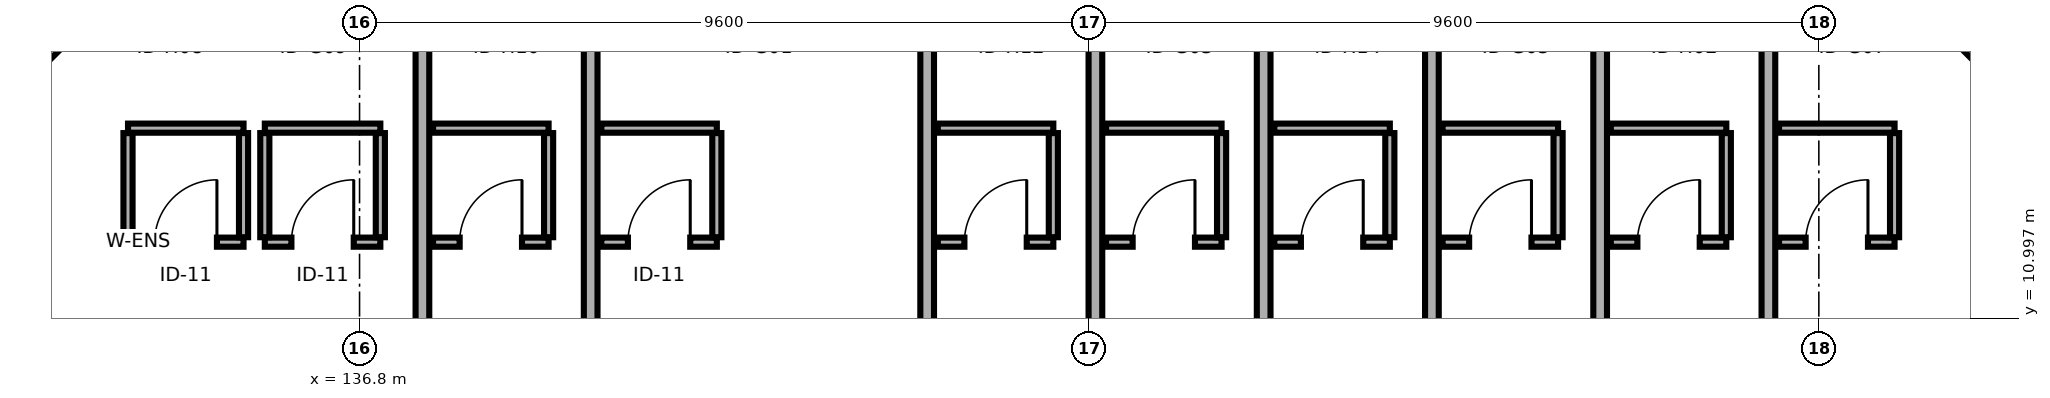
"""IFC4 building model, lengths in metres.
Left out: names, types, materials, properties, quantities, classifications, styles, units other than length and angle.
Written with IfcOpenShell. Run it as: python <this file> out.ifc"""

import sys

from ifc_helpers import new_model, si_unit, direction, frame, frame_2d, origin, place, context, subcontext, project, spatial, rectangle, extrude, element, fill, save


model = new_model("IFC4")
c1 = context("Model", 3, precision=1e-05, world=origin(), true_north=direction((0.0, 1.0)))
c2 = subcontext(c1, "Body", "Model", "MODEL_VIEW")
j1 = project(units=[si_unit("LENGTHUNIT", "METRE"), si_unit("PLANEANGLEUNIT", "RADIAN")], contexts=[c1])
p1 = place(None, origin())
s1 = spatial("IfcSite", under=j1, at=p1, CompositionType="ELEMENT")
p2 = place(p1, origin())
s2 = spatial("IfcBuilding", under=s1, at=p2, CompositionType="ELEMENT")
p3 = place(p2, frame((0.0, 0.0, 21.5)))
s3 = spatial("IfcBuildingStorey", under=s2, at=p3, CompositionType="ELEMENT", Elevation=21.5)
p4 = place(p3, frame((133.754, 12.0, 0.0), z_axis=(0.0, 0.0, 1.0), x_axis=(1.0, 0.0, 0.0)))
e1 = element("IfcWall", 1, at=p4, inside=s3, PredefinedType="PARTITIONING", context=c2, shape_type="SweptSolid", body=[
    extrude(rectangle(XDim=1.52, YDim=0.12, at=frame_2d((0.76, 0.0))), origin(), (0.0, 0.0, 1.0), 2.73),
])
p5 = place(p4, frame((0.35, 0.0, 0.0)))
e2 = element("IfcOpeningElement", 2, at=p5, cuts=e1, PredefinedType="OPENING", context=c2, shape_type="SweptSolid", body=[
    extrude(rectangle(XDim=0.82, YDim=2.08, at=frame_2d((0.41, 1.04))), frame((0.0, 0.07, 0.0), z_axis=(0.0, -1.0, 0.0), x_axis=(1.0, 0.0, 0.0)), (0.0, 0.0, 1.0), 0.14),
])
p6 = place(p3, frame((133.754, 13.5, 0.0), z_axis=(0.0, 0.0, 1.0), x_axis=(1.0, 0.0, 0.0)))
e3 = element("IfcWall", 3, at=p6, inside=s3, PredefinedType="PARTITIONING", context=c2, shape_type="SweptSolid", body=[
    extrude(rectangle(XDim=1.52, YDim=0.12, at=frame_2d((0.76, 0.0))), origin(), (0.0, 0.0, 1.0), 3.195),
])
p7 = place(p3, frame((133.754, 12.065, 0.0), z_axis=(0.0, 0.0, 1.0), x_axis=(0.0, 1.0, 0.0)))
e4 = element("IfcWall", 4, at=p7, inside=s3, PredefinedType="PARTITIONING", context=c2, shape_type="SweptSolid", body=[
    extrude(rectangle(XDim=1.37, YDim=0.12, at=frame_2d((0.685, 0.0))), origin(), (0.0, 0.0, 1.0), 3.195),
])
p8 = place(p3, frame((135.274, 12.065, 0.0), z_axis=(0.0, 0.0, 1.0), x_axis=(0.0, 1.0, 0.0)))
e5 = element("IfcWall", 5, at=p8, inside=s3, PredefinedType="PARTITIONING", context=c2, shape_type="SweptSolid", body=[
    extrude(rectangle(XDim=1.37, YDim=0.12, at=frame_2d((0.685, 0.0))), origin(), (0.0, 0.0, 1.0), 2.73),
])
p9 = place(p3, frame((133.2, 15.0, 0.0), z_axis=(0.0, 0.0, 1.0), x_axis=(-0.707106781187, -0.707106781187, 0.0)))
e6 = element("IfcWall", 6, at=p9, inside=s3, PredefinedType="PARTITIONING", context=c2, shape_type="SweptSolid", body=[
    extrude(rectangle(XDim=5.698, YDim=0.18, at=frame_2d((2.849, 0.0))), origin(), (0.0, 0.0, 1.0), 2.68),
])
p10 = place(p3, frame((135.554, 12.0, 0.0), z_axis=(0.0, 0.0, 1.0), x_axis=(1.0, 0.0, 0.0)))
e7 = element("IfcWall", 7, at=p10, inside=s3, PredefinedType="PARTITIONING", context=c2, shape_type="SweptSolid", body=[
    extrude(rectangle(XDim=1.52, YDim=0.12, at=frame_2d((0.76, 0.0))), origin(), (0.0, 0.0, 1.0), 3.195),
])
p11 = place(p10, frame((0.35, 0.0, 0.0)))
e8 = element("IfcOpeningElement", 8, at=p11, cuts=e7, PredefinedType="OPENING", context=c2, shape_type="SweptSolid", body=[
    extrude(rectangle(XDim=0.82, YDim=2.08, at=frame_2d((0.41, 1.04))), frame((0.0, 0.07, 0.0), z_axis=(0.0, -1.0, 0.0), x_axis=(1.0, 0.0, 0.0)), (0.0, 0.0, 1.0), 0.14),
])
p12 = place(p3, frame((135.554, 13.5, 0.0), z_axis=(0.0, 0.0, 1.0), x_axis=(1.0, 0.0, 0.0)))
e9 = element("IfcWall", 9, at=p12, inside=s3, PredefinedType="PARTITIONING", context=c2, shape_type="SweptSolid", body=[
    extrude(rectangle(XDim=1.52, YDim=0.12, at=frame_2d((0.76, 0.0))), origin(), (0.0, 0.0, 1.0), 2.73),
])
p13 = place(p3, frame((135.554, 12.065, 0.0), z_axis=(0.0, 0.0, 1.0), x_axis=(0.0, 1.0, 0.0)))
e10 = element("IfcWall", 10, at=p13, inside=s3, PredefinedType="PARTITIONING", context=c2, shape_type="SweptSolid", body=[
    extrude(rectangle(XDim=1.37, YDim=0.12, at=frame_2d((0.685, 0.0))), origin(), (0.0, 0.0, 1.0), 2.73),
])
p14 = place(p3, frame((137.073, 12.065, 0.0), z_axis=(0.0, 0.0, 1.0), x_axis=(0.0, 1.0, 0.0)))
e11 = element("IfcWall", 11, at=p14, inside=s3, PredefinedType="PARTITIONING", context=c2, shape_type="SweptSolid", body=[
    extrude(rectangle(XDim=1.37, YDim=0.12, at=frame_2d((0.685, 0.0))), origin(), (0.0, 0.0, 1.0), 3.195),
])
p15 = place(p3, frame((137.627, 6.454, 0.0), z_axis=(0.0, 0.0, 1.0), x_axis=(0.0, 1.0, 0.0)))
e12 = element("IfcWall", 12, at=p15, inside=s3, PredefinedType="PARTITIONING", context=c2, shape_type="SweptSolid", body=[
    extrude(rectangle(XDim=8.546, YDim=0.18, at=frame_2d((4.273, 0.0))), origin(), (0.0, 0.0, 1.0), 2.68),
])
p16 = place(p3, frame((137.767, 12.0, 0.0), z_axis=(0.0, 0.0, 1.0), x_axis=(1.0, 0.0, 0.0)))
e13 = element("IfcWall", 13, at=p16, inside=s3, PredefinedType="PARTITIONING", context=c2, shape_type="SweptSolid", body=[
    extrude(rectangle(XDim=1.52, YDim=0.12, at=frame_2d((0.76, 0.0))), origin(), (0.0, 0.0, 1.0), 3.195),
])
p17 = place(p16, frame((0.35, 0.0, 0.0)))
e14 = element("IfcOpeningElement", 14, at=p17, cuts=e13, PredefinedType="OPENING", context=c2, shape_type="SweptSolid", body=[
    extrude(rectangle(XDim=0.82, YDim=2.08, at=frame_2d((0.41, 1.04))), frame((0.0, 0.07, 0.0), z_axis=(0.0, -1.0, 0.0), x_axis=(1.0, 0.0, 0.0)), (0.0, 0.0, 1.0), 0.14),
])
p18 = place(p3, frame((137.767, 13.5, 0.0), z_axis=(0.0, 0.0, 1.0), x_axis=(1.0, 0.0, 0.0)))
e15 = element("IfcWall", 15, at=p18, inside=s3, PredefinedType="PARTITIONING", context=c2, shape_type="SweptSolid", body=[
    extrude(rectangle(XDim=1.52, YDim=0.12, at=frame_2d((0.76, 0.0))), origin(), (0.0, 0.0, 1.0), 3.195),
])
p19 = place(p3, frame((139.287, 12.065, 0.0), z_axis=(0.0, 0.0, 1.0), x_axis=(0.0, 1.0, 0.0)))
e16 = element("IfcWall", 16, at=p19, inside=s3, PredefinedType="PARTITIONING", context=c2, shape_type="SweptSolid", body=[
    extrude(rectangle(XDim=1.37, YDim=0.12, at=frame_2d((0.685, 0.0))), origin(), (0.0, 0.0, 1.0), 3.195),
])
p20 = place(p3, frame((139.841, 6.156, 0.0), z_axis=(0.0, 0.0, 1.0), x_axis=(0.0, 1.0, 0.0)))
e17 = element("IfcWall", 17, at=p20, inside=s3, PredefinedType="PARTITIONING", context=c2, shape_type="SweptSolid", body=[
    extrude(rectangle(XDim=8.844, YDim=0.18, at=frame_2d((4.422, 0.0))), origin(), (0.0, 0.0, 1.0), 2.68),
])
p21 = place(p3, frame((139.981, 12.0, 0.0), z_axis=(0.0, 0.0, 1.0), x_axis=(1.0, 0.0, 0.0)))
e18 = element("IfcWall", 18, at=p21, inside=s3, PredefinedType="PARTITIONING", context=c2, shape_type="SweptSolid", body=[
    extrude(rectangle(XDim=1.52, YDim=0.12, at=frame_2d((0.76, 0.0))), origin(), (0.0, 0.0, 1.0), 2.73),
])
p22 = place(p21, frame((0.35, 0.0, 0.0)))
e19 = element("IfcOpeningElement", 19, at=p22, cuts=e18, PredefinedType="OPENING", context=c2, shape_type="SweptSolid", body=[
    extrude(rectangle(XDim=0.82, YDim=2.08, at=frame_2d((0.41, 1.04))), frame((0.0, 0.07, 0.0), z_axis=(0.0, -1.0, 0.0), x_axis=(1.0, 0.0, 0.0)), (0.0, 0.0, 1.0), 0.14),
])
p23 = place(p3, frame((139.981, 13.5, 0.0), z_axis=(0.0, 0.0, 1.0), x_axis=(1.0, 0.0, 0.0)))
e20 = element("IfcWall", 20, at=p23, inside=s3, PredefinedType="PARTITIONING", context=c2, shape_type="SweptSolid", body=[
    extrude(rectangle(XDim=1.52, YDim=0.12, at=frame_2d((0.76, 0.0))), origin(), (0.0, 0.0, 1.0), 2.73),
])
p24 = place(p3, frame((141.501, 12.065, 0.0), z_axis=(0.0, 0.0, 1.0), x_axis=(0.0, 1.0, 0.0)))
e21 = element("IfcWall", 21, at=p24, inside=s3, PredefinedType="PARTITIONING", context=c2, shape_type="SweptSolid", body=[
    extrude(rectangle(XDim=1.37, YDim=0.12, at=frame_2d((0.685, 0.0))), origin(), (0.0, 0.0, 1.0), 2.73),
])
p25 = place(p3, frame((144.268, 5.99, 0.0), z_axis=(0.0, 0.0, 1.0), x_axis=(0.0, 1.0, 0.0)))
e22 = element("IfcWall", 22, at=p25, inside=s3, PredefinedType="PARTITIONING", context=c2, shape_type="SweptSolid", body=[
    extrude(rectangle(XDim=9.01, YDim=0.18, at=frame_2d((4.505, 0.0))), origin(), (0.0, 0.0, 1.0), 2.68),
])
p26 = place(p3, frame((144.408, 12.0, 0.0), z_axis=(0.0, 0.0, 1.0), x_axis=(1.0, 0.0, 0.0)))
e23 = element("IfcWall", 23, at=p26, inside=s3, PredefinedType="PARTITIONING", context=c2, shape_type="SweptSolid", body=[
    extrude(rectangle(XDim=1.52, YDim=0.12, at=frame_2d((0.76, 0.0))), origin(), (0.0, 0.0, 1.0), 3.195),
])
p27 = place(p26, frame((0.35, 0.0, 0.0)))
e24 = element("IfcOpeningElement", 24, at=p27, cuts=e23, PredefinedType="OPENING", context=c2, shape_type="SweptSolid", body=[
    extrude(rectangle(XDim=0.82, YDim=2.08, at=frame_2d((0.41, 1.04))), frame((0.0, 0.07, 0.0), z_axis=(0.0, -1.0, 0.0), x_axis=(1.0, 0.0, 0.0)), (0.0, 0.0, 1.0), 0.14),
])
p28 = place(p3, frame((144.408, 13.5, 0.0), z_axis=(0.0, 0.0, 1.0), x_axis=(1.0, 0.0, 0.0)))
e25 = element("IfcWall", 25, at=p28, inside=s3, PredefinedType="PARTITIONING", context=c2, shape_type="SweptSolid", body=[
    extrude(rectangle(XDim=1.52, YDim=0.12, at=frame_2d((0.76, 0.0))), origin(), (0.0, 0.0, 1.0), 3.195),
])
p29 = place(p3, frame((145.928, 12.065, 0.0), z_axis=(0.0, 0.0, 1.0), x_axis=(0.0, 1.0, 0.0)))
e26 = element("IfcWall", 26, at=p29, inside=s3, PredefinedType="PARTITIONING", context=c2, shape_type="SweptSolid", body=[
    extrude(rectangle(XDim=1.37, YDim=0.12, at=frame_2d((0.685, 0.0))), origin(), (0.0, 0.0, 1.0), 3.195),
])
p30 = place(p3, frame((146.482, 5.99, 0.0), z_axis=(0.0, 0.0, 1.0), x_axis=(0.0, 1.0, 0.0)))
e27 = element("IfcWall", 27, at=p30, inside=s3, PredefinedType="PARTITIONING", context=c2, shape_type="SweptSolid", body=[
    extrude(rectangle(XDim=9.01, YDim=0.18, at=frame_2d((4.505, 0.0))), origin(), (0.0, 0.0, 1.0), 2.68),
])
p31 = place(p3, frame((146.622, 12.0, 0.0), z_axis=(0.0, 0.0, 1.0), x_axis=(1.0, 0.0, 0.0)))
e28 = element("IfcWall", 28, at=p31, inside=s3, PredefinedType="PARTITIONING", context=c2, shape_type="SweptSolid", body=[
    extrude(rectangle(XDim=1.52, YDim=0.12, at=frame_2d((0.76, 0.0))), origin(), (0.0, 0.0, 1.0), 3.195),
])
p32 = place(p31, frame((0.35, 0.0, 0.0)))
e29 = element("IfcOpeningElement", 29, at=p32, cuts=e28, PredefinedType="OPENING", context=c2, shape_type="SweptSolid", body=[
    extrude(rectangle(XDim=0.82, YDim=2.08, at=frame_2d((0.41, 1.04))), frame((0.0, 0.07, 0.0), z_axis=(0.0, -1.0, 0.0), x_axis=(1.0, 0.0, 0.0)), (0.0, 0.0, 1.0), 0.14),
])
p33 = place(p3, frame((146.622, 13.5, 0.0), z_axis=(0.0, 0.0, 1.0), x_axis=(1.0, 0.0, 0.0)))
e30 = element("IfcWall", 30, at=p33, inside=s3, PredefinedType="PARTITIONING", context=c2, shape_type="SweptSolid", body=[
    extrude(rectangle(XDim=1.52, YDim=0.12, at=frame_2d((0.76, 0.0))), origin(), (0.0, 0.0, 1.0), 3.195),
])
p34 = place(p3, frame((148.142, 12.065, 0.0), z_axis=(0.0, 0.0, 1.0), x_axis=(0.0, 1.0, 0.0)))
e31 = element("IfcWall", 31, at=p34, inside=s3, PredefinedType="PARTITIONING", context=c2, shape_type="SweptSolid", body=[
    extrude(rectangle(XDim=1.37, YDim=0.12, at=frame_2d((0.685, 0.0))), origin(), (0.0, 0.0, 1.0), 3.195),
])
p35 = place(p3, frame((148.696, 5.99, 0.0), z_axis=(0.0, 0.0, 1.0), x_axis=(0.0, 1.0, 0.0)))
e32 = element("IfcWall", 32, at=p35, inside=s3, PredefinedType="PARTITIONING", context=c2, shape_type="SweptSolid", body=[
    extrude(rectangle(XDim=9.01, YDim=0.18, at=frame_2d((4.505, 0.0))), origin(), (0.0, 0.0, 1.0), 2.68),
])
p36 = place(p3, frame((148.835, 12.0, 0.0), z_axis=(0.0, 0.0, 1.0), x_axis=(1.0, 0.0, 0.0)))
e33 = element("IfcWall", 33, at=p36, inside=s3, PredefinedType="PARTITIONING", context=c2, shape_type="SweptSolid", body=[
    extrude(rectangle(XDim=1.52, YDim=0.12, at=frame_2d((0.76, 0.0))), origin(), (0.0, 0.0, 1.0), 2.73),
])
p37 = place(p36, frame((0.35, 0.0, 0.0)))
e34 = element("IfcOpeningElement", 34, at=p37, cuts=e33, PredefinedType="OPENING", context=c2, shape_type="SweptSolid", body=[
    extrude(rectangle(XDim=0.82, YDim=2.08, at=frame_2d((0.41, 1.04))), frame((0.0, 0.07, 0.0), z_axis=(0.0, -1.0, 0.0), x_axis=(1.0, 0.0, 0.0)), (0.0, 0.0, 1.0), 0.14),
])
p38 = place(p3, frame((148.835, 13.5, 0.0), z_axis=(0.0, 0.0, 1.0), x_axis=(1.0, 0.0, 0.0)))
e35 = element("IfcWall", 35, at=p38, inside=s3, PredefinedType="PARTITIONING", context=c2, shape_type="SweptSolid", body=[
    extrude(rectangle(XDim=1.52, YDim=0.12, at=frame_2d((0.76, 0.0))), origin(), (0.0, 0.0, 1.0), 2.73),
])
p39 = place(p3, frame((150.355, 12.065, 0.0), z_axis=(0.0, 0.0, 1.0), x_axis=(0.0, 1.0, 0.0)))
e36 = element("IfcWall", 36, at=p39, inside=s3, PredefinedType="PARTITIONING", context=c2, shape_type="SweptSolid", body=[
    extrude(rectangle(XDim=1.37, YDim=0.12, at=frame_2d((0.685, 0.0))), origin(), (0.0, 0.0, 1.0), 3.195),
])
p40 = place(p3, frame((150.909, 6.19, 0.0), z_axis=(0.0, 0.0, 1.0), x_axis=(0.0, 1.0, 0.0)))
e37 = element("IfcWall", 37, at=p40, inside=s3, PredefinedType="PARTITIONING", context=c2, shape_type="SweptSolid", body=[
    extrude(rectangle(XDim=8.81, YDim=0.18, at=frame_2d((4.405, 0.0))), origin(), (0.0, 0.0, 1.0), 2.68),
])
p41 = place(p3, frame((151.049, 12.0, 0.0), z_axis=(0.0, 0.0, 1.0), x_axis=(1.0, 0.0, 0.0)))
e38 = element("IfcWall", 38, at=p41, inside=s3, PredefinedType="PARTITIONING", context=c2, shape_type="SweptSolid", body=[
    extrude(rectangle(XDim=1.52, YDim=0.12, at=frame_2d((0.76, 0.0))), origin(), (0.0, 0.0, 1.0), 3.195),
])
p42 = place(p41, frame((0.35, 0.0, 0.0)))
e39 = element("IfcOpeningElement", 39, at=p42, cuts=e38, PredefinedType="OPENING", context=c2, shape_type="SweptSolid", body=[
    extrude(rectangle(XDim=0.82, YDim=2.08, at=frame_2d((0.41, 1.04))), frame((0.0, 0.07, 0.0), z_axis=(0.0, -1.0, 0.0), x_axis=(1.0, 0.0, 0.0)), (0.0, 0.0, 1.0), 0.14),
])
p43 = place(p3, frame((151.049, 13.5, 0.0), z_axis=(0.0, 0.0, 1.0), x_axis=(1.0, 0.0, 0.0)))
e40 = element("IfcWall", 40, at=p43, inside=s3, PredefinedType="PARTITIONING", context=c2, shape_type="SweptSolid", body=[
    extrude(rectangle(XDim=1.52, YDim=0.12, at=frame_2d((0.76, 0.0))), origin(), (0.0, 0.0, 1.0), 3.195),
])
p44 = place(p3, frame((152.569, 12.065, 0.0), z_axis=(0.0, 0.0, 1.0), x_axis=(0.0, 1.0, 0.0)))
e41 = element("IfcWall", 41, at=p44, inside=s3, PredefinedType="PARTITIONING", context=c2, shape_type="SweptSolid", body=[
    extrude(rectangle(XDim=1.37, YDim=0.12, at=frame_2d((0.685, 0.0))), origin(), (0.0, 0.0, 1.0), 3.195),
])
p45 = place(p3, frame((153.123, 6.56, 0.0), z_axis=(0.0, 0.0, 1.0), x_axis=(0.0, 1.0, 0.0)))
e42 = element("IfcWall", 42, at=p45, inside=s3, PredefinedType="PARTITIONING", context=c2, shape_type="SweptSolid", body=[
    extrude(rectangle(XDim=8.44, YDim=0.18, at=frame_2d((4.22, 0.0))), origin(), (0.0, 0.0, 1.0), 2.68),
])
p46 = place(p3, frame((153.263, 12.0, 0.0), z_axis=(0.0, 0.0, 1.0), x_axis=(1.0, 0.0, 0.0)))
e43 = element("IfcWall", 43, at=p46, inside=s3, PredefinedType="PARTITIONING", context=c2, shape_type="SweptSolid", body=[
    extrude(rectangle(XDim=1.52, YDim=0.12, at=frame_2d((0.76, 0.0))), origin(), (0.0, 0.0, 1.0), 3.195),
])
p47 = place(p46, frame((0.35, 0.0, 0.0)))
e44 = element("IfcOpeningElement", 44, at=p47, cuts=e43, PredefinedType="OPENING", context=c2, shape_type="SweptSolid", body=[
    extrude(rectangle(XDim=0.82, YDim=2.08, at=frame_2d((0.41, 1.04))), frame((0.0, 0.07, 0.0), z_axis=(0.0, -1.0, 0.0), x_axis=(1.0, 0.0, 0.0)), (0.0, 0.0, 1.0), 0.14),
])
p48 = place(p3, frame((153.263, 13.5, 0.0), z_axis=(0.0, 0.0, 1.0), x_axis=(1.0, 0.0, 0.0)))
e45 = element("IfcWall", 45, at=p48, inside=s3, PredefinedType="PARTITIONING", context=c2, shape_type="SweptSolid", body=[
    extrude(rectangle(XDim=1.52, YDim=0.12, at=frame_2d((0.76, 0.0))), origin(), (0.0, 0.0, 1.0), 3.195),
])
p49 = place(p3, frame((154.783, 12.065, 0.0), z_axis=(0.0, 0.0, 1.0), x_axis=(0.0, 1.0, 0.0)))
e46 = element("IfcWall", 46, at=p49, inside=s3, PredefinedType="PARTITIONING", context=c2, shape_type="SweptSolid", body=[
    extrude(rectangle(XDim=1.37, YDim=0.12, at=frame_2d((0.685, 0.0))), origin(), (0.0, 0.0, 1.0), 3.195),
])
p50 = place(p3, frame((155.336, 7.232, 0.0), z_axis=(0.0, 0.0, 1.0), x_axis=(0.0, 1.0, 0.0)))
e47 = element("IfcWall", 47, at=p50, inside=s3, PredefinedType="PARTITIONING", context=c2, shape_type="SweptSolid", body=[
    extrude(rectangle(XDim=7.768, YDim=0.18, at=frame_2d((3.884, 0.0))), origin(), (0.0, 0.0, 1.0), 2.68),
])
p51 = place(p3, frame((155.476, 12.0, 0.0), z_axis=(0.0, 0.0, 1.0), x_axis=(1.0, 0.0, 0.0)))
e48 = element("IfcWall", 48, at=p51, inside=s3, PredefinedType="PARTITIONING", context=c2, shape_type="SweptSolid", body=[
    extrude(rectangle(XDim=1.52, YDim=0.12, at=frame_2d((0.76, 0.0))), origin(), (0.0, 0.0, 1.0), 2.73),
])
p52 = place(p51, frame((0.35, 0.0, 0.0)))
e49 = element("IfcOpeningElement", 49, at=p52, cuts=e48, PredefinedType="OPENING", context=c2, shape_type="SweptSolid", body=[
    extrude(rectangle(XDim=0.82, YDim=2.08, at=frame_2d((0.41, 1.04))), frame((0.0, 0.07, 0.0), z_axis=(0.0, -1.0, 0.0), x_axis=(1.0, 0.0, 0.0)), (0.0, 0.0, 1.0), 0.14),
])
p53 = place(p3, frame((155.476, 13.5, 0.0), z_axis=(0.0, 0.0, 1.0), x_axis=(1.0, 0.0, 0.0)))
e50 = element("IfcWall", 50, at=p53, inside=s3, PredefinedType="PARTITIONING", context=c2, shape_type="SweptSolid", body=[
    extrude(rectangle(XDim=1.52, YDim=0.12, at=frame_2d((0.76, 0.0))), origin(), (0.0, 0.0, 1.0), 2.73),
])
p54 = place(p3, frame((156.996, 12.065, 0.0), z_axis=(0.0, 0.0, 1.0), x_axis=(0.0, 1.0, 0.0)))
e51 = element("IfcWall", 51, at=p54, inside=s3, PredefinedType="PARTITIONING", context=c2, shape_type="SweptSolid", body=[
    extrude(rectangle(XDim=1.37, YDim=0.12, at=frame_2d((0.685, 0.0))), origin(), (0.0, 0.0, 1.0), 3.195),
])
p55 = place(p3, frame((157.55, 15.0, 0.0), z_axis=(0.0, 0.0, 1.0), x_axis=(0.707106781187, -0.707106781187, 0.0)))
e52 = element("IfcWall", 52, at=p55, inside=s3, PredefinedType="PARTITIONING", context=c2, shape_type="SweptSolid", body=[
    extrude(rectangle(XDim=5.475, YDim=0.18, at=frame_2d((2.737, 0.0))), origin(), (0.0, 0.0, 1.0), 2.68),
])
p56 = place(p5, origin())
e53 = element("IfcDoor", 53, at=p56, inside=s3, OperationType="SINGLE_SWING_RIGHT", PredefinedType="DOOR", context=c2, shape_type="SweptSolid", body=[
    extrude(rectangle(XDim=0.82, YDim=2.08, at=frame_2d((0.41, 1.04))), frame((0.0, 0.025, 0.0), z_axis=(0.0, -1.0, 0.0), x_axis=(1.0, 0.0, 0.0)), (0.0, 0.0, 1.0), 0.05),
])
fill(e2, e53)
p57 = place(p11, origin())
e54 = element("IfcDoor", 54, at=p57, inside=s3, OperationType="SINGLE_SWING_RIGHT", PredefinedType="DOOR", context=c2, shape_type="SweptSolid", body=[
    extrude(rectangle(XDim=0.82, YDim=2.08, at=frame_2d((0.41, 1.04))), frame((0.0, 0.025, 0.0), z_axis=(0.0, -1.0, 0.0), x_axis=(1.0, 0.0, 0.0)), (0.0, 0.0, 1.0), 0.05),
])
fill(e8, e54)
p58 = place(p17, origin())
e55 = element("IfcDoor", 55, at=p58, inside=s3, OperationType="SINGLE_SWING_RIGHT", PredefinedType="DOOR", context=c2, shape_type="SweptSolid", body=[
    extrude(rectangle(XDim=0.82, YDim=2.08, at=frame_2d((0.41, 1.04))), frame((0.0, 0.025, 0.0), z_axis=(0.0, -1.0, 0.0), x_axis=(1.0, 0.0, 0.0)), (0.0, 0.0, 1.0), 0.05),
])
fill(e14, e55)
p59 = place(p22, origin())
e56 = element("IfcDoor", 56, at=p59, inside=s3, OperationType="SINGLE_SWING_RIGHT", PredefinedType="DOOR", context=c2, shape_type="SweptSolid", body=[
    extrude(rectangle(XDim=0.82, YDim=2.08, at=frame_2d((0.41, 1.04))), frame((0.0, 0.025, 0.0), z_axis=(0.0, -1.0, 0.0), x_axis=(1.0, 0.0, 0.0)), (0.0, 0.0, 1.0), 0.05),
])
fill(e19, e56)
p60 = place(p27, origin())
e57 = element("IfcDoor", 57, at=p60, inside=s3, OperationType="SINGLE_SWING_RIGHT", PredefinedType="DOOR", context=c2, shape_type="SweptSolid", body=[
    extrude(rectangle(XDim=0.82, YDim=2.08, at=frame_2d((0.41, 1.04))), frame((0.0, 0.025, 0.0), z_axis=(0.0, -1.0, 0.0), x_axis=(1.0, 0.0, 0.0)), (0.0, 0.0, 1.0), 0.05),
])
fill(e24, e57)
p61 = place(p32, origin())
e58 = element("IfcDoor", 58, at=p61, inside=s3, OperationType="SINGLE_SWING_RIGHT", PredefinedType="DOOR", context=c2, shape_type="SweptSolid", body=[
    extrude(rectangle(XDim=0.82, YDim=2.08, at=frame_2d((0.41, 1.04))), frame((0.0, 0.025, 0.0), z_axis=(0.0, -1.0, 0.0), x_axis=(1.0, 0.0, 0.0)), (0.0, 0.0, 1.0), 0.05),
])
fill(e29, e58)
p62 = place(p37, origin())
e59 = element("IfcDoor", 59, at=p62, inside=s3, OperationType="SINGLE_SWING_RIGHT", PredefinedType="DOOR", context=c2, shape_type="SweptSolid", body=[
    extrude(rectangle(XDim=0.82, YDim=2.08, at=frame_2d((0.41, 1.04))), frame((0.0, 0.025, 0.0), z_axis=(0.0, -1.0, 0.0), x_axis=(1.0, 0.0, 0.0)), (0.0, 0.0, 1.0), 0.05),
])
fill(e34, e59)
p63 = place(p42, origin())
e60 = element("IfcDoor", 60, at=p63, inside=s3, OperationType="SINGLE_SWING_RIGHT", PredefinedType="DOOR", context=c2, shape_type="SweptSolid", body=[
    extrude(rectangle(XDim=0.82, YDim=2.08, at=frame_2d((0.41, 1.04))), frame((0.0, 0.025, 0.0), z_axis=(0.0, -1.0, 0.0), x_axis=(1.0, 0.0, 0.0)), (0.0, 0.0, 1.0), 0.05),
])
fill(e39, e60)
p64 = place(p47, origin())
e61 = element("IfcDoor", 61, at=p64, inside=s3, OperationType="SINGLE_SWING_RIGHT", PredefinedType="DOOR", context=c2, shape_type="SweptSolid", body=[
    extrude(rectangle(XDim=0.82, YDim=2.08, at=frame_2d((0.41, 1.04))), frame((0.0, 0.025, 0.0), z_axis=(0.0, -1.0, 0.0), x_axis=(1.0, 0.0, 0.0)), (0.0, 0.0, 1.0), 0.05),
])
fill(e44, e61)
p65 = place(p52, origin())
e62 = element("IfcDoor", 62, at=p65, inside=s3, OperationType="SINGLE_SWING_RIGHT", PredefinedType="DOOR", context=c2, shape_type="SweptSolid", body=[
    extrude(rectangle(XDim=0.82, YDim=2.08, at=frame_2d((0.41, 1.04))), frame((0.0, 0.025, 0.0), z_axis=(0.0, -1.0, 0.0), x_axis=(1.0, 0.0, 0.0)), (0.0, 0.0, 1.0), 0.05),
])
fill(e49, e62)
save(model, sys.argv[1])
